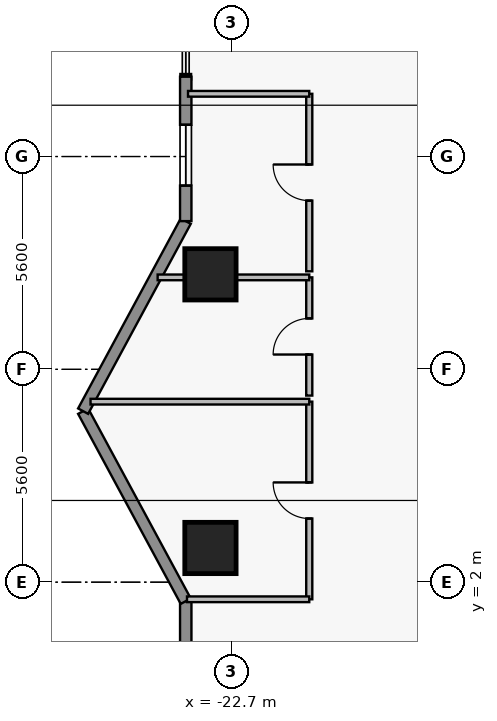
"""IFC4 building model, lengths in metres.
Left out: names, types, materials, properties, quantities, classifications, styles, units other than length and angle.
Written with IfcOpenShell. Run it as: python <this file> out.ifc"""

import sys

from ifc_helpers import new_model, si_unit, direction, frame, frame_2d, origin, origin_2d, place, context, subcontext, project, spatial, rectangle, extrude, element, fill, save


model = new_model("IFC4")
c1 = context("Model", 3, precision=1e-05, world=origin(), true_north=direction((0.0, 1.0)))
c2 = subcontext(c1, "Body", "Model", "MODEL_VIEW")
j1 = project(units=[si_unit("LENGTHUNIT", "METRE"), si_unit("PLANEANGLEUNIT", "RADIAN")], contexts=[c1])
p1 = place(None, origin())
s1 = spatial("IfcSite", under=j1, at=p1, CompositionType="ELEMENT")
p2 = place(p1, origin())
s2 = spatial("IfcBuilding", under=s1, at=p2, CompositionType="ELEMENT")
p3 = place(p2, frame((0.0, 0.0, 110.25)))
s3 = spatial("IfcBuildingStorey", under=s2, at=p3, CompositionType="ELEMENT", Elevation=110.25)
for number, where, z_axis, x_axis in (
    (1, (-23.25, 2.9, 0.0), (0.0, 0.0, 1.0), (1.0, 0.0, 0.0)),
    (2, (-23.25, 10.1, 0.0), (0.0, 0.0, 1.0), (1.0, 0.0, 0.0)),
):
    element("IfcColumn", number, at=place(p3, frame(where, z_axis=z_axis, x_axis=x_axis)), inside=s3, PredefinedType="COLUMN", context=c2, shape_type="SweptSolid", body=[
        extrude(rectangle(XDim=1.35, YDim=1.35, at=origin_2d()), origin(), (0.0, 0.0, 1.0), 3.65),
    ])
p4 = place(p3, frame((-23.9, 0.35, 0.0), z_axis=(0.0, 0.0, 1.0), x_axis=(0.0, 1.0, 0.0)))
e3 = element("IfcWall", 3, at=p4, inside=s3, PredefinedType="STANDARD", context=c2, shape_type="SweptSolid", body=[
    extrude(rectangle(XDim=1.15, YDim=0.3, at=frame_2d((0.575, 0.0))), origin(), (0.0, 0.0, 1.0), 3.43),
])
for number, where, z_axis, x_axis in (
    (4, (-23.9, 1.5, 0.0), (0.0, 0.0, 1.0), (-0.475, 0.88, 0.0)),
    (5, (-26.6, 6.5, 0.0), (0.0, 0.0, 1.0), (0.475, 0.88, 0.0)),
):
    element("IfcWall", number, at=place(p3, frame(where, z_axis=z_axis, x_axis=x_axis)), inside=s3, PredefinedType="STANDARD", context=c2, shape_type="SweptSolid", body=[
        extrude(rectangle(XDim=5.683, YDim=0.3, at=frame_2d((2.841, 0.0))), origin(), (0.0, 0.0, 1.0), 3.43),
    ])
p5 = place(p3, frame((-23.9, 11.5, 0.0), z_axis=(0.0, 0.0, 1.0), x_axis=(0.0, 1.0, 0.0)))
e6 = element("IfcWall", 6, at=p5, inside=s3, PredefinedType="STANDARD", context=c2, shape_type="SweptSolid", body=[
    extrude(rectangle(XDim=3.8, YDim=0.3, at=frame_2d((1.9, 0.0))), origin(), (0.0, 0.0, 1.0), 3.43),
])
p6 = place(p5, frame((0.935, 0.0, 0.85)))
e7 = element("IfcOpeningElement", 7, at=p6, cuts=e6, PredefinedType="OPENING", context=c2, shape_type="SweptSolid", body=[
    extrude(rectangle(XDim=1.6, YDim=1.8, at=frame_2d((0.8, 0.9))), frame((0.0, 0.16, 0.0), z_axis=(0.0, -1.0, 0.0), x_axis=(1.0, 0.0, 0.0)), (0.0, 0.0, 1.0), 0.32),
])
p7 = place(p3, frame((-20.65, 1.55, 0.0), z_axis=(0.0, 0.0, 1.0), x_axis=(0.0, 1.0, 0.0)))
e8 = element("IfcWall", 8, at=p7, inside=s3, PredefinedType="PARTITIONING", context=c2, shape_type="SweptSolid", body=[
    extrude(rectangle(XDim=5.2, YDim=0.16, at=frame_2d((2.6, 0.0))), origin(), (0.0, 0.0, 1.0), 3.43),
])
p8 = place(p7, frame((2.125, 0.0, 0.0)))
e9 = element("IfcOpeningElement", 9, at=p8, cuts=e8, PredefinedType="OPENING", context=c2, shape_type="SweptSolid", body=[
    extrude(rectangle(XDim=0.95, YDim=2.15, at=frame_2d((0.475, 1.075))), frame((0.0, 0.09, 0.0), z_axis=(0.0, -1.0, 0.0), x_axis=(1.0, 0.0, 0.0)), (0.0, 0.0, 1.0), 0.18),
])
p9 = place(p3, frame((-20.65, 6.91, 0.0), z_axis=(0.0, 0.0, 1.0), x_axis=(0.0, 1.0, 0.0)))
e10 = element("IfcWall", 10, at=p9, inside=s3, PredefinedType="PARTITIONING", context=c2, shape_type="SweptSolid", body=[
    extrude(rectangle(XDim=3.11, YDim=0.16, at=frame_2d((1.555, 0.0))), origin(), (0.0, 0.0, 1.0), 3.43),
])
p10 = place(p9, frame((1.08, 0.0, 0.0)))
e11 = element("IfcOpeningElement", 11, at=p10, cuts=e10, PredefinedType="OPENING", context=c2, shape_type="SweptSolid", body=[
    extrude(rectangle(XDim=0.95, YDim=2.15, at=frame_2d((0.475, 1.075))), frame((0.0, 0.09, 0.0), z_axis=(0.0, -1.0, 0.0), x_axis=(1.0, 0.0, 0.0)), (0.0, 0.0, 1.0), 0.18),
])
p11 = place(p3, frame((-20.65, 10.18, 0.0), z_axis=(0.0, 0.0, 1.0), x_axis=(0.0, 1.0, 0.0)))
e12 = element("IfcWall", 12, at=p11, inside=s3, PredefinedType="PARTITIONING", context=c2, shape_type="SweptSolid", body=[
    extrude(rectangle(XDim=4.67, YDim=0.16, at=frame_2d((2.335, 0.0))), origin(), (0.0, 0.0, 1.0), 3.43),
])
p12 = place(p11, frame((1.86, 0.0, 0.0)))
e13 = element("IfcOpeningElement", 13, at=p12, cuts=e12, PredefinedType="OPENING", context=c2, shape_type="SweptSolid", body=[
    extrude(rectangle(XDim=0.95, YDim=2.15, at=frame_2d((0.475, 1.075))), frame((0.0, 0.09, 0.0), z_axis=(0.0, -1.0, 0.0), x_axis=(1.0, 0.0, 0.0)), (0.0, 0.0, 1.0), 0.18),
])
p13 = place(p3, frame((-23.867, 1.55, 0.0), z_axis=(0.0, 0.0, 1.0), x_axis=(1.0, 0.0, 0.0)))
e14 = element("IfcWall", 14, at=p13, inside=s3, PredefinedType="PARTITIONING", context=c2, shape_type="SweptSolid", body=[
    extrude(rectangle(XDim=3.217, YDim=0.15, at=frame_2d((1.608, 0.0))), origin(), (0.0, 0.0, 1.0), 3.43),
])
p14 = place(p3, frame((-26.405, 6.75, 0.0), z_axis=(0.0, 0.0, 1.0), x_axis=(1.0, 0.0, 0.0)))
e15 = element("IfcWall", 15, at=p14, inside=s3, PredefinedType="PARTITIONING", context=c2, shape_type="SweptSolid", body=[
    extrude(rectangle(XDim=5.755, YDim=0.15, at=frame_2d((2.877, 0.0))), origin(), (0.0, 0.0, 1.0), 3.43),
])
p15 = place(p3, frame((-24.639, 10.02, 0.0), z_axis=(0.0, 0.0, 1.0), x_axis=(1.0, 0.0, 0.0)))
e16 = element("IfcWall", 16, at=p15, inside=s3, PredefinedType="PARTITIONING", context=c2, shape_type="SweptSolid", body=[
    extrude(rectangle(XDim=3.989, YDim=0.15, at=frame_2d((1.995, 0.0))), origin(), (0.0, 0.0, 1.0), 3.43),
])
p16 = place(p3, frame((-23.84, 14.85, 0.0), z_axis=(0.0, 0.0, 1.0), x_axis=(1.0, 0.0, 0.0)))
e17 = element("IfcWall", 17, at=p16, inside=s3, PredefinedType="PARTITIONING", context=c2, shape_type="SweptSolid", body=[
    extrude(rectangle(XDim=3.19, YDim=0.15, at=frame_2d((1.595, 0.0))), origin(), (0.0, 0.0, 1.0), 3.43),
])
p17 = place(p6, origin())
e18 = element("IfcWindow", 18, at=p17, inside=s3, PartitioningType="SINGLE_PANEL", PredefinedType="WINDOW", context=c2, shape_type="SweptSolid", body=[
    extrude(rectangle(XDim=1.6, YDim=1.8, at=frame_2d((0.8, 0.9))), frame((0.0, 0.03, 0.0), z_axis=(0.0, -1.0, 0.0), x_axis=(1.0, 0.0, 0.0)), (0.0, 0.0, 1.0), 0.06),
])
fill(e7, e18)
p18 = place(p8, origin())
e19 = element("IfcDoor", 19, at=p18, inside=s3, OperationType="SINGLE_SWING_RIGHT", PredefinedType="DOOR", context=c2, shape_type="SweptSolid", body=[
    extrude(rectangle(XDim=0.95, YDim=2.15, at=frame_2d((0.475, 1.075))), frame((0.0, 0.025, 0.0), z_axis=(0.0, -1.0, 0.0), x_axis=(1.0, 0.0, 0.0)), (0.0, 0.0, 1.0), 0.05),
])
fill(e9, e19)
p19 = place(p10, origin())
e20 = element("IfcDoor", 20, at=p19, inside=s3, OperationType="SINGLE_SWING_LEFT", PredefinedType="DOOR", context=c2, shape_type="SweptSolid", body=[
    extrude(rectangle(XDim=0.95, YDim=2.15, at=frame_2d((0.475, 1.075))), frame((0.0, 0.025, 0.0), z_axis=(0.0, -1.0, 0.0), x_axis=(1.0, 0.0, 0.0)), (0.0, 0.0, 1.0), 0.05),
])
fill(e11, e20)
p20 = place(p12, origin())
e21 = element("IfcDoor", 21, at=p20, inside=s3, OperationType="SINGLE_SWING_RIGHT", PredefinedType="DOOR", context=c2, shape_type="SweptSolid", body=[
    extrude(rectangle(XDim=0.95, YDim=2.15, at=frame_2d((0.475, 1.075))), frame((0.0, 0.025, 0.0), z_axis=(0.0, -1.0, 0.0), x_axis=(1.0, 0.0, 0.0)), (0.0, 0.0, 1.0), 0.05),
])
fill(e13, e21)
save(model, sys.argv[1])
